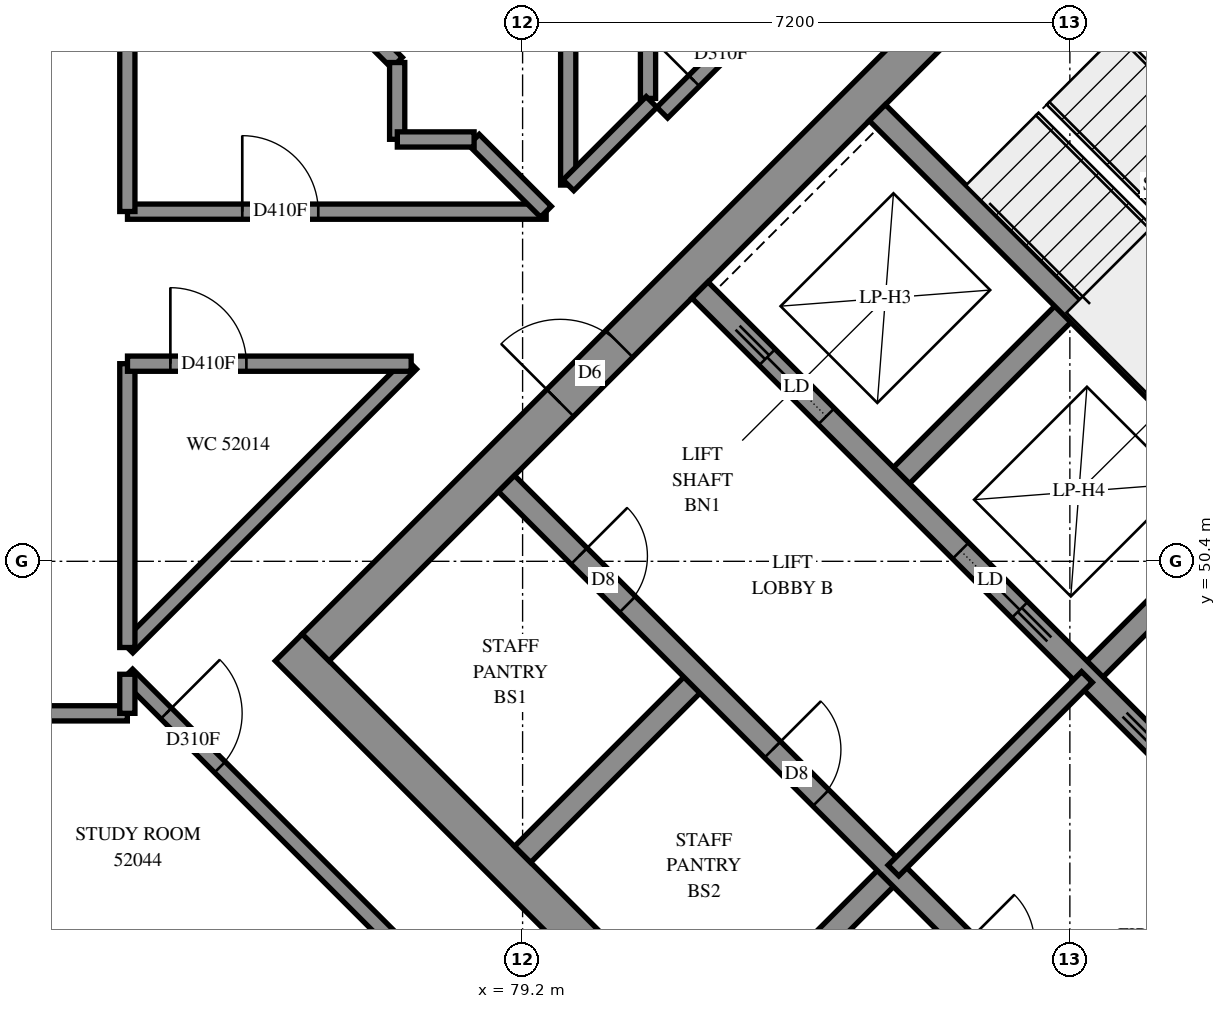
"""IFC4 building model, lengths in metres.
Left out: names, types, materials, properties, quantities, classifications, styles, units other than length and angle.
Written with IfcOpenShell. Run it as: python <this file> out.ifc"""

import sys

from ifc_helpers import new_model, si_unit, direction, frame, frame_2d, origin, place, context, subcontext, project, spatial, rectangle, extrude, element, fill, save


model = new_model("IFC4")
c1 = context("Model", 3, precision=1e-05, world=origin(), true_north=direction((0.0, 1.0)))
c2 = subcontext(c1, "Body", "Model", "MODEL_VIEW")
j1 = project(units=[si_unit("LENGTHUNIT", "METRE"), si_unit("PLANEANGLEUNIT", "RADIAN")], contexts=[c1])
p1 = place(None, origin())
s1 = spatial("IfcSite", under=j1, at=p1, CompositionType="ELEMENT")
p2 = place(p1, origin())
s2 = spatial("IfcBuilding", under=s1, at=p2, CompositionType="ELEMENT")
p3 = place(p2, frame((0.0, 0.0, 193.0)))
s3 = spatial("IfcBuildingStorey", under=s2, at=p3, CompositionType="ELEMENT", Elevation=193.0)
p4 = place(p3, frame((76.124, 49.267, -0.3), z_axis=(0.0, 0.0, 1.0), x_axis=(0.7071067812, -0.7071067812, 0.0)))
e1 = element("IfcWall", 1, at=p4, inside=s3, PredefinedType="SHEAR", context=c2, shape_type="SweptSolid", body=[
    extrude(rectangle(XDim=15.4, YDim=0.5, at=frame_2d((7.7, 0.0))), origin(), (0.0, 0.0, 1.0), 2.7),
])
p5 = place(p3, frame((86.66, 59.802, -0.3), z_axis=(0.0, 0.0, 1.0), x_axis=(0.7071067812, -0.7071067812, 0.0)))
e2 = element("IfcWall", 2, at=p5, inside=s3, PredefinedType="SHEAR", context=c2, shape_type="SweptSolid", body=[
    extrude(rectangle(XDim=15.4, YDim=0.5, at=frame_2d((7.7, 0.0))), origin(), (0.0, 0.0, 1.0), 2.7),
])
p6 = place(p5, frame((10.5, 0.0, 0.3)))
e3 = element("IfcOpeningElement", 3, at=p6, cuts=e2, PredefinedType="OPENING", context=c2, shape_type="SweptSolid", body=[
    extrude(rectangle(XDim=0.8, YDim=2.1, at=frame_2d((0.4, 1.05))), frame((0.0, 0.26, 0.0), z_axis=(0.0, -1.0, 0.0), x_axis=(1.0, 0.0, 0.0)), (0.0, 0.0, 1.0), 0.52),
])
p7 = place(p3, frame((76.478, 49.267, -0.3), z_axis=(0.0, 0.0, 1.0), x_axis=(0.7071067812, 0.7071067812, 0.0)))
e4 = element("IfcWall", 4, at=p7, inside=s3, PredefinedType="SHEAR", context=c2, shape_type="SweptSolid", body=[
    extrude(rectangle(XDim=14.4, YDim=0.5, at=frame_2d((7.2, 0.0))), origin(), (0.0, 0.0, 1.0), 2.7),
])
p8 = place(p7, frame((4.55, 0.0, 0.3)))
e5 = element("IfcOpeningElement", 5, at=p8, cuts=e4, PredefinedType="OPENING", context=c2, shape_type="SweptSolid", body=[
    extrude(rectangle(XDim=1.1, YDim=2.1, at=frame_2d((0.55, 1.05))), frame((0.0, 0.26, 0.0), z_axis=(0.0, -1.0, 0.0), x_axis=(1.0, 0.0, 0.0)), (0.0, 0.0, 1.0), 0.52),
])
p9 = place(p7, frame((11.35, 0.0, 0.3)))
e6 = element("IfcOpeningElement", 6, at=p9, cuts=e4, PredefinedType="OPENING", context=c2, shape_type="SweptSolid", body=[
    extrude(rectangle(XDim=1.1, YDim=2.1, at=frame_2d((0.55, 1.05))), frame((0.0, 0.26, 0.0), z_axis=(0.0, -1.0, 0.0), x_axis=(1.0, 0.0, 0.0)), (0.0, 0.0, 1.0), 0.52),
])
p10 = place(p3, frame((87.013, 38.731, -0.3), z_axis=(0.0, 0.0, 1.0), x_axis=(0.7071067812, 0.7071067812, 0.0)))
e7 = element("IfcWall", 7, at=p10, inside=s3, PredefinedType="SHEAR", context=c2, shape_type="SweptSolid", body=[
    extrude(rectangle(XDim=14.4, YDim=0.5, at=frame_2d((7.2, 0.0))), origin(), (0.0, 0.0, 1.0), 2.7),
])
p11 = place(p10, frame((4.55, 0.0, 0.3)))
e8 = element("IfcOpeningElement", 8, at=p11, cuts=e7, PredefinedType="OPENING", context=c2, shape_type="SweptSolid", body=[
    extrude(rectangle(XDim=1.1, YDim=2.1, at=frame_2d((0.55, 1.05))), frame((0.0, 0.26, 0.0), z_axis=(0.0, -1.0, 0.0), x_axis=(1.0, 0.0, 0.0)), (0.0, 0.0, 1.0), 0.52),
])
p12 = place(p10, frame((11.35, 0.0, 0.3)))
e9 = element("IfcOpeningElement", 9, at=p12, cuts=e7, PredefinedType="OPENING", context=c2, shape_type="SweptSolid", body=[
    extrude(rectangle(XDim=1.1, YDim=2.1, at=frame_2d((0.55, 1.05))), frame((0.0, 0.26, 0.0), z_axis=(0.0, -1.0, 0.0), x_axis=(1.0, 0.0, 0.0)), (0.0, 0.0, 1.0), 0.52),
])
for number, where, z_axis, x_axis in (
    (10, (79.2, 46.544, 0.0), (0.0, 0.0, 1.0), (0.707, 0.707, 0.0)),
    (11, (84.079, 51.423, 0.0), (0.0, 0.0, 1.0), (0.707, 0.707, 0.0)),
):
    element("IfcWall", number, at=place(p3, frame(where, z_axis=z_axis, x_axis=x_axis)), inside=s3, PredefinedType="SOLIDWALL", context=c2, shape_type="SweptSolid", body=[
        extrude(rectangle(XDim=3.3, YDim=0.3, at=frame_2d((1.65, 0.0))), origin(), (0.0, 0.0, 1.0), 3.1),
    ])
p13 = place(p3, frame((81.746, 43.999, 0.0), z_axis=(0.0, 0.0, 1.0), x_axis=(0.7071067812, 0.7071067812, 0.0)))
e12 = element("IfcWall", 12, at=p13, inside=s3, PredefinedType="SOLIDWALL", context=c2, shape_type="SweptSolid", body=[
    extrude(rectangle(XDim=3.3, YDim=0.3, at=frame_2d((1.65, 0.0))), origin(), (0.0, 0.0, 1.0), 3.1),
])
p14 = place(p3, frame((86.625, 48.878, 0.0), z_axis=(0.0, 0.0, 1.0), x_axis=(0.7071067812, 0.7071067812, 0.0)))
e13 = element("IfcWall", 13, at=p14, inside=s3, PredefinedType="SOLIDWALL", context=c2, shape_type="SweptSolid", body=[
    extrude(rectangle(XDim=3.3, YDim=0.3, at=frame_2d((1.65, 0.0))), origin(), (0.0, 0.0, 1.0), 3.1),
])
p15 = place(p3, frame((78.988, 51.423, 0.0), z_axis=(0.0, 0.0, 1.0), x_axis=(0.7071067812, -0.7071067812, 0.0)))
e14 = element("IfcWall", 14, at=p15, inside=s3, PredefinedType="SOLIDWALL", context=c2, shape_type="SweptSolid", body=[
    extrude(rectangle(XDim=14.4, YDim=0.3, at=frame_2d((7.2, 0.0))), origin(), (0.0, 0.0, 1.0), 3.1),
])
p16 = place(p15, frame((1.35, 0.0, 0.0)))
e15 = element("IfcOpeningElement", 15, at=p16, cuts=e14, PredefinedType="OPENING", context=c2, shape_type="SweptSolid", body=[
    extrude(rectangle(XDim=0.9, YDim=2.1, at=frame_2d((0.45, 1.05))), frame((0.0, 0.16, 0.0), z_axis=(0.0, -1.0, 0.0), x_axis=(1.0, 0.0, 0.0)), (0.0, 0.0, 1.0), 0.32),
])
p17 = place(p15, frame((4.95, 0.0, 0.0)))
e16 = element("IfcOpeningElement", 16, at=p17, cuts=e14, PredefinedType="OPENING", context=c2, shape_type="SweptSolid", body=[
    extrude(rectangle(XDim=0.9, YDim=2.1, at=frame_2d((0.45, 1.05))), frame((0.0, 0.16, 0.0), z_axis=(0.0, -1.0, 0.0), x_axis=(1.0, 0.0, 0.0)), (0.0, 0.0, 1.0), 0.32),
])
p18 = place(p15, frame((8.55, 0.0, 0.0)))
e17 = element("IfcOpeningElement", 17, at=p18, cuts=e14, PredefinedType="OPENING", context=c2, shape_type="SweptSolid", body=[
    extrude(rectangle(XDim=0.9, YDim=2.1, at=frame_2d((0.45, 1.05))), frame((0.0, 0.16, 0.0), z_axis=(0.0, -1.0, 0.0), x_axis=(1.0, 0.0, 0.0)), (0.0, 0.0, 1.0), 0.32),
])
p19 = place(p15, frame((12.05, 0.0, 0.0)))
e18 = element("IfcOpeningElement", 18, at=p19, cuts=e14, PredefinedType="OPENING", context=c2, shape_type="SweptSolid", body=[
    extrude(rectangle(XDim=1.1, YDim=2.1, at=frame_2d((0.55, 1.05))), frame((0.0, 0.16, 0.0), z_axis=(0.0, -1.0, 0.0), x_axis=(1.0, 0.0, 0.0)), (0.0, 0.0, 1.0), 0.32),
])
p20 = place(p3, frame((81.534, 53.969, 0.0), z_axis=(0.0, 0.0, 1.0), x_axis=(0.707103309, -0.7071102534, 0.0)))
e19 = element("IfcWall", 19, at=p20, inside=s3, PredefinedType="SOLIDWALL", context=c2, shape_type="SweptSolid", body=[
    extrude(rectangle(XDim=14.4, YDim=0.3, at=frame_2d((7.2, 0.0))), origin(), (0.0, 0.0, 1.0), 3.1),
])
p21 = place(p20, frame((1.25, 0.0, 0.0)))
e20 = element("IfcOpeningElement", 20, at=p21, cuts=e19, PredefinedType="OPENING", context=c2, shape_type="SweptSolid", body=[
    extrude(rectangle(XDim=1.1, YDim=2.1, at=frame_2d((0.55, 1.05))), frame((0.0, 0.16, 0.0), z_axis=(0.0, -1.0, 0.0), x_axis=(1.0, 0.0, 0.0)), (0.0, 0.0, 1.0), 0.32),
])
p22 = place(p20, frame((4.85, 0.0, 0.0)))
e21 = element("IfcOpeningElement", 21, at=p22, cuts=e19, PredefinedType="OPENING", context=c2, shape_type="SweptSolid", body=[
    extrude(rectangle(XDim=1.1, YDim=2.1, at=frame_2d((0.55, 1.05))), frame((0.0, 0.16, 0.0), z_axis=(0.0, -1.0, 0.0), x_axis=(1.0, 0.0, 0.0)), (0.0, 0.0, 1.0), 0.32),
])
p23 = place(p20, frame((8.45, 0.0, 0.0)))
e22 = element("IfcOpeningElement", 22, at=p23, cuts=e19, PredefinedType="OPENING", context=c2, shape_type="SweptSolid", body=[
    extrude(rectangle(XDim=1.1, YDim=2.1, at=frame_2d((0.55, 1.05))), frame((0.0, 0.16, 0.0), z_axis=(0.0, -1.0, 0.0), x_axis=(1.0, 0.0, 0.0)), (0.0, 0.0, 1.0), 0.32),
])
p24 = place(p20, frame((12.05, 0.0, 0.0)))
e23 = element("IfcOpeningElement", 23, at=p24, cuts=e19, PredefinedType="OPENING", context=c2, shape_type="SweptSolid", body=[
    extrude(rectangle(XDim=1.1, YDim=2.1, at=frame_2d((0.55, 1.05))), frame((0.0, 0.16, 0.0), z_axis=(0.0, -1.0, 0.0), x_axis=(1.0, 0.0, 0.0)), (0.0, 0.0, 1.0), 0.32),
])
p25 = place(p3, frame((83.867, 56.302, 0.0), z_axis=(0.0, 0.0, 1.0), x_axis=(0.7071137256, -0.7070998367, 0.0)))
e24 = element("IfcWall", 24, at=p25, inside=s3, PredefinedType="SOLIDWALL", context=c2, shape_type="SweptSolid", body=[
    extrude(rectangle(XDim=7.2, YDim=0.3, at=frame_2d((3.6, 0.0))), origin(), (0.0, 0.0, 1.0), 3.1),
])
p26 = place(p3, frame((84.079, 46.332, 0.0), z_axis=(0.0, 0.0, 1.0), x_axis=(0.7071067812, 0.7071067812, 0.0)))
e25 = element("IfcWall", 25, at=p26, inside=s3, PredefinedType="PARTITIONING", context=c2, shape_type="SweptSolid", body=[
    extrude(rectangle(XDim=3.6, YDim=0.2, at=frame_2d((1.8, 0.0))), origin(), (0.0, 0.0, 1.0), 3.1),
])
p27 = place(p3, frame((55.6, 48.4, 0.0), z_axis=(0.0, 0.0, 1.0), x_axis=(1.0, 0.0, 0.0)))
e26 = element("IfcWall", 26, at=p27, inside=s3, PredefinedType="PARTITIONING", context=c2, shape_type="SweptSolid", body=[
    extrude(rectangle(XDim=18.4, YDim=0.2, at=frame_2d((9.2, 0.0))), origin(), (0.0, 0.0, 1.0), 3.1),
])
p28 = place(p27, frame((5.862, 0.0, 0.0)))
e27 = element("IfcOpeningElement", 27, at=p28, cuts=e26, PredefinedType="OPENING", context=c2, shape_type="SweptSolid", body=[
    extrude(rectangle(XDim=1.0, YDim=2.1, at=frame_2d((0.5, 1.05))), frame((0.0, 0.11, 0.0), z_axis=(0.0, -1.0, 0.0), x_axis=(1.0, 0.0, 0.0)), (0.0, 0.0, 1.0), 0.22),
])
p29 = place(p27, frame((11.5, 0.0, 0.0)))
e28 = element("IfcOpeningElement", 28, at=p29, cuts=e26, PredefinedType="OPENING", context=c2, shape_type="SweptSolid", body=[
    extrude(rectangle(XDim=0.9, YDim=2.1, at=frame_2d((0.45, 1.05))), frame((0.0, 0.11, 0.0), z_axis=(0.0, -1.0, 0.0), x_axis=(1.0, 0.0, 0.0)), (0.0, 0.0, 1.0), 0.22),
])
p30 = place(p27, frame((13.2, 0.0, 0.0)))
e29 = element("IfcOpeningElement", 29, at=p30, cuts=e26, PredefinedType="OPENING", context=c2, shape_type="SweptSolid", body=[
    extrude(rectangle(XDim=0.9, YDim=2.1, at=frame_2d((0.45, 1.05))), frame((0.0, 0.11, 0.0), z_axis=(0.0, -1.0, 0.0), x_axis=(1.0, 0.0, 0.0)), (0.0, 0.0, 1.0), 0.22),
])
p31 = place(p3, frame((81.037, 56.303, 0.0), z_axis=(0.0, 0.0, 1.0), x_axis=(0.7071067812, 0.7071067812, 0.0)))
e30 = element("IfcWall", 30, at=p31, inside=s3, PredefinedType="PARTITIONING", context=c2, shape_type="SweptSolid", body=[
    extrude(rectangle(XDim=8.2, YDim=0.2, at=frame_2d((4.1, 0.0))), origin(), (0.0, 0.0, 1.0), 3.1),
])
p32 = place(p31, frame((0.592, 0.0, 0.0)))
e31 = element("IfcOpeningElement", 31, at=p32, cuts=e30, PredefinedType="OPENING", context=c2, shape_type="SweptSolid", body=[
    extrude(rectangle(XDim=1.0, YDim=2.1, at=frame_2d((0.5, 1.05))), frame((0.0, 0.11, 0.0), z_axis=(0.0, -1.0, 0.0), x_axis=(1.0, 0.0, 0.0)), (0.0, 0.0, 1.0), 0.22),
])
p33 = place(p3, frame((73.999, 48.911, 0.0), z_axis=(0.0, 0.0, 1.0), x_axis=(0.7071067812, -0.7071067812, 0.0)))
e32 = element("IfcWall", 32, at=p33, inside=s3, PredefinedType="PARTITIONING", context=c2, shape_type="SweptSolid", body=[
    extrude(rectangle(XDim=5.745, YDim=0.2, at=frame_2d((2.872, 0.0))), origin(), (0.0, 0.0, 1.0), 3.1),
])
p34 = place(p33, frame((0.724, 0.0, 0.0)))
e33 = element("IfcOpeningElement", 33, at=p34, cuts=e32, PredefinedType="OPENING", context=c2, shape_type="SweptSolid", body=[
    extrude(rectangle(XDim=1.0, YDim=2.1, at=frame_2d((0.5, 1.05))), frame((0.0, 0.11, 0.0), z_axis=(0.0, -1.0, 0.0), x_axis=(1.0, 0.0, 0.0)), (0.0, 0.0, 1.0), 0.22),
])
p35 = place(p3, frame((74.002, 55.0, 0.0), z_axis=(0.0, 0.0, 1.0), x_axis=(1.0, 0.0, 0.0)))
e34 = element("IfcWall", 34, at=p35, inside=s3, PredefinedType="PARTITIONING", context=c2, shape_type="SweptSolid", body=[
    extrude(rectangle(XDim=5.508, YDim=0.2, at=frame_2d((2.754, 0.0))), origin(), (0.0, 0.0, 1.0), 3.1),
])
p36 = place(p35, frame((1.51, 0.0, 0.0)))
e35 = element("IfcOpeningElement", 35, at=p36, cuts=e34, PredefinedType="OPENING", context=c2, shape_type="SweptSolid", body=[
    extrude(rectangle(XDim=1.0, YDim=2.1, at=frame_2d((0.5, 1.05))), frame((0.0, 0.11, 0.0), z_axis=(0.0, -1.0, 0.0), x_axis=(1.0, 0.0, 0.0)), (0.0, 0.0, 1.0), 0.22),
])
p37 = place(p3, frame((74.0, 55.002, 0.0), z_axis=(0.0, 0.0, 1.0), x_axis=(0.0, 1.0, 0.0)))
e36 = element("IfcWall", 36, at=p37, inside=s3, PredefinedType="PARTITIONING", context=c2, shape_type="SweptSolid", body=[
    extrude(rectangle(XDim=5.508, YDim=0.2, at=frame_2d((2.754, 0.0))), origin(), (0.0, 0.0, 1.0), 3.1),
])
p38 = place(p3, frame((74.001, 49.267, 0.0), z_axis=(0.0, 0.0, 1.0), x_axis=(0.7071067812, 0.7071067812, 0.0)))
e37 = element("IfcWall", 37, at=p38, inside=s3, PredefinedType="PARTITIONING", context=c2, shape_type="SweptSolid", body=[
    extrude(rectangle(XDim=5.278, YDim=0.2, at=frame_2d((2.639, 0.0))), origin(), (0.0, 0.0, 1.0), 3.1),
])
p39 = place(p3, frame((74.197, 60.309, 0.0), z_axis=(0.0, 0.0, 1.0), x_axis=(0.7071067812, -0.7071067812, 0.0)))
e38 = element("IfcWall", 38, at=p39, inside=s3, PredefinedType="PARTITIONING", context=c2, shape_type="SweptSolid", body=[
    extrude(rectangle(XDim=4.738, YDim=0.2, at=frame_2d((2.369, 0.0))), origin(), (0.0, 0.0, 1.0), 3.1),
])
p40 = place(p3, frame((79.8, 55.35, 0.0), z_axis=(0.0, 0.0, 1.0), x_axis=(0.0, 1.0, 0.0)))
e39 = element("IfcWall", 39, at=p40, inside=s3, PredefinedType="PARTITIONING", context=c2, shape_type="SweptSolid", body=[
    extrude(rectangle(XDim=3.9, YDim=0.2, at=frame_2d((1.95, 0.0))), origin(), (0.0, 0.0, 1.0), 3.1),
])
p41 = place(p3, frame((74.0, 49.266, 0.0), z_axis=(0.0, 0.0, 1.0), x_axis=(0.0, 1.0, 0.0)))
e40 = element("IfcWall", 40, at=p41, inside=s3, PredefinedType="PARTITIONING", context=c2, shape_type="SweptSolid", body=[
    extrude(rectangle(XDim=3.734, YDim=0.2, at=frame_2d((1.867, 0.0))), origin(), (0.0, 0.0, 1.0), 3.1),
])
p42 = place(p3, frame((74.002, 53.0, 0.0), z_axis=(0.0, 0.0, 1.0), x_axis=(1.0, 0.0, 0.0)))
e41 = element("IfcWall", 41, at=p42, inside=s3, PredefinedType="PARTITIONING", context=c2, shape_type="SweptSolid", body=[
    extrude(rectangle(XDim=3.732, YDim=0.2, at=frame_2d((1.866, 0.0))), origin(), (0.0, 0.0, 1.0), 3.1),
])
p43 = place(p42, frame((0.564, 0.0, 0.0)))
e42 = element("IfcOpeningElement", 42, at=p43, cuts=e41, PredefinedType="OPENING", context=c2, shape_type="SweptSolid", body=[
    extrude(rectangle(XDim=1.0, YDim=2.1, at=frame_2d((0.5, 1.05))), frame((0.0, 0.11, 0.0), z_axis=(0.0, -1.0, 0.0), x_axis=(1.0, 0.0, 0.0)), (0.0, 0.0, 1.0), 0.22),
])
p44 = place(p3, frame((80.85, 56.49, 0.0), z_axis=(0.0, 0.0, 1.0), x_axis=(0.0, 1.0, 0.0)))
e43 = element("IfcWall", 43, at=p44, inside=s3, PredefinedType="PARTITIONING", context=c2, shape_type="SweptSolid", body=[
    extrude(rectangle(XDim=1.886, YDim=0.2, at=frame_2d((0.943, 0.0))), origin(), (0.0, 0.0, 1.0), 3.1),
])
p45 = place(p3, frame((79.803, 55.347, 0.0), z_axis=(0.0, 0.0, 1.0), x_axis=(0.706460727, 0.7077522457, 0.0)))
e44 = element("IfcWall", 44, at=p45, inside=s3, PredefinedType="PARTITIONING", context=c2, shape_type="SweptSolid", body=[
    extrude(rectangle(XDim=1.549, YDim=0.2, at=frame_2d((0.774, 0.0))), origin(), (0.0, 0.0, 1.0), 3.1),
])
p46 = place(p3, frame((78.559, 55.947, 0.0), z_axis=(0.0, 0.0, 1.0), x_axis=(0.7071067812, -0.7071067812, 0.0)))
e45 = element("IfcWall", 45, at=p46, inside=s3, PredefinedType="PARTITIONING", context=c2, shape_type="SweptSolid", body=[
    extrude(rectangle(XDim=1.341, YDim=0.2, at=frame_2d((0.67, 0.0))), origin(), (0.0, 0.0, 1.0), 3.1),
])
for number, where, z_axis, x_axis in (
    (46, (77.55, 55.952, 0.0), (0.0, 0.0, 1.0), (0.0, 1.0, 0.0)),
    (47, (77.552, 55.95, 0.0), (0.0, 0.0, 1.0), (1.0, 0.0, 0.0)),
):
    element("IfcWall", number, at=place(p3, frame(where, z_axis=z_axis, x_axis=x_axis)), inside=s3, PredefinedType="PARTITIONING", context=c2, shape_type="SweptSolid", body=[
        extrude(rectangle(XDim=1.01, YDim=0.2, at=frame_2d((0.505, 0.0))), origin(), (0.0, 0.0, 1.0), 3.1),
    ])
p47 = place(p3, frame((74.0, 48.4, 0.0), z_axis=(0.0, 0.0, 1.0), x_axis=(0.0, 1.0, 0.0)))
e48 = element("IfcWall", 48, at=p47, inside=s3, PredefinedType="PARTITIONING", context=c2, shape_type="SweptSolid", body=[
    extrude(rectangle(XDim=0.514, YDim=0.2, at=frame_2d((0.257, 0.0))), origin(), (0.0, 0.0, 1.0), 3.1),
])
p48 = place(p8, origin())
e49 = element("IfcDoor", 49, at=p48, inside=s3, OperationType="DOUBLE_DOOR_SINGLE_SWING", PredefinedType="DOOR", context=c2, shape_type="SweptSolid", body=[
    extrude(rectangle(XDim=1.1, YDim=2.1, at=frame_2d((0.55, 1.05))), frame((0.0, 0.025, 0.0), z_axis=(0.0, -1.0, 0.0), x_axis=(1.0, 0.0, 0.0)), (0.0, 0.0, 1.0), 0.05),
])
fill(e5, e49)
p49 = place(p16, origin())
e50 = element("IfcDoor", 50, at=p49, inside=s3, OperationType="SINGLE_SWING_LEFT", PredefinedType="DOOR", context=c2, shape_type="SweptSolid", body=[
    extrude(rectangle(XDim=0.9, YDim=2.1, at=frame_2d((0.45, 1.05))), frame((0.0, 0.025, 0.0), z_axis=(0.0, -1.0, 0.0), x_axis=(1.0, 0.0, 0.0)), (0.0, 0.0, 1.0), 0.05),
])
fill(e15, e50)
p50 = place(p17, origin())
e51 = element("IfcDoor", 51, at=p50, inside=s3, OperationType="SINGLE_SWING_LEFT", PredefinedType="DOOR", context=c2, shape_type="SweptSolid", body=[
    extrude(rectangle(XDim=0.9, YDim=2.1, at=frame_2d((0.45, 1.05))), frame((0.0, 0.025, 0.0), z_axis=(0.0, -1.0, 0.0), x_axis=(1.0, 0.0, 0.0)), (0.0, 0.0, 1.0), 0.05),
])
fill(e16, e51)
p51 = place(p21, origin())
e52 = element("IfcDoor", 52, at=p51, inside=s3, OperationType="SLIDING_TO_LEFT", PredefinedType="DOOR", context=c2, shape_type="SweptSolid", body=[
    extrude(rectangle(XDim=1.1, YDim=2.1, at=frame_2d((0.55, 1.05))), frame((0.0, 0.025, 0.0), z_axis=(0.0, -1.0, 0.0), x_axis=(1.0, 0.0, 0.0)), (0.0, 0.0, 1.0), 0.05),
])
fill(e20, e52)
p52 = place(p22, origin())
e53 = element("IfcDoor", 53, at=p52, inside=s3, OperationType="SLIDING_TO_RIGHT", PredefinedType="DOOR", context=c2, shape_type="SweptSolid", body=[
    extrude(rectangle(XDim=1.1, YDim=2.1, at=frame_2d((0.55, 1.05))), frame((0.0, 0.025, 0.0), z_axis=(0.0, -1.0, 0.0), x_axis=(1.0, 0.0, 0.0)), (0.0, 0.0, 1.0), 0.05),
])
fill(e21, e53)
p53 = place(p43, origin())
e54 = element("IfcDoor", 54, at=p53, inside=s3, OperationType="SINGLE_SWING_RIGHT", PredefinedType="DOOR", context=c2, shape_type="SweptSolid", body=[
    extrude(rectangle(XDim=1.0, YDim=2.1, at=frame_2d((0.5, 1.05))), frame((0.0, 0.025, 0.0), z_axis=(0.0, -1.0, 0.0), x_axis=(1.0, 0.0, 0.0)), (0.0, 0.0, 1.0), 0.05),
])
fill(e42, e54)
p54 = place(p34, origin())
e55 = element("IfcDoor", 55, at=p54, inside=s3, OperationType="SINGLE_SWING_LEFT", PredefinedType="DOOR", context=c2, shape_type="SweptSolid", body=[
    extrude(rectangle(XDim=1.0, YDim=2.1, at=frame_2d((0.5, 1.05))), frame((0.0, 0.025, 0.0), z_axis=(0.0, -1.0, 0.0), x_axis=(1.0, 0.0, 0.0)), (0.0, 0.0, 1.0), 0.05),
])
fill(e33, e55)
p55 = place(p36, origin())
e56 = element("IfcDoor", 56, at=p55, inside=s3, OperationType="SINGLE_SWING_LEFT", PredefinedType="DOOR", context=c2, shape_type="SweptSolid", body=[
    extrude(rectangle(XDim=1.0, YDim=2.1, at=frame_2d((0.5, 1.05))), frame((0.0, 0.025, 0.0), z_axis=(0.0, -1.0, 0.0), x_axis=(1.0, 0.0, 0.0)), (0.0, 0.0, 1.0), 0.05),
])
fill(e35, e56)
p56 = place(p32, origin())
e57 = element("IfcDoor", 57, at=p56, inside=s3, OperationType="SINGLE_SWING_RIGHT", PredefinedType="DOOR", context=c2, shape_type="SweptSolid", body=[
    extrude(rectangle(XDim=1.0, YDim=2.1, at=frame_2d((0.5, 1.05))), frame((0.0, 0.025, 0.0), z_axis=(0.0, -1.0, 0.0), x_axis=(1.0, 0.0, 0.0)), (0.0, 0.0, 1.0), 0.05),
])
fill(e31, e57)
save(model, sys.argv[1])
